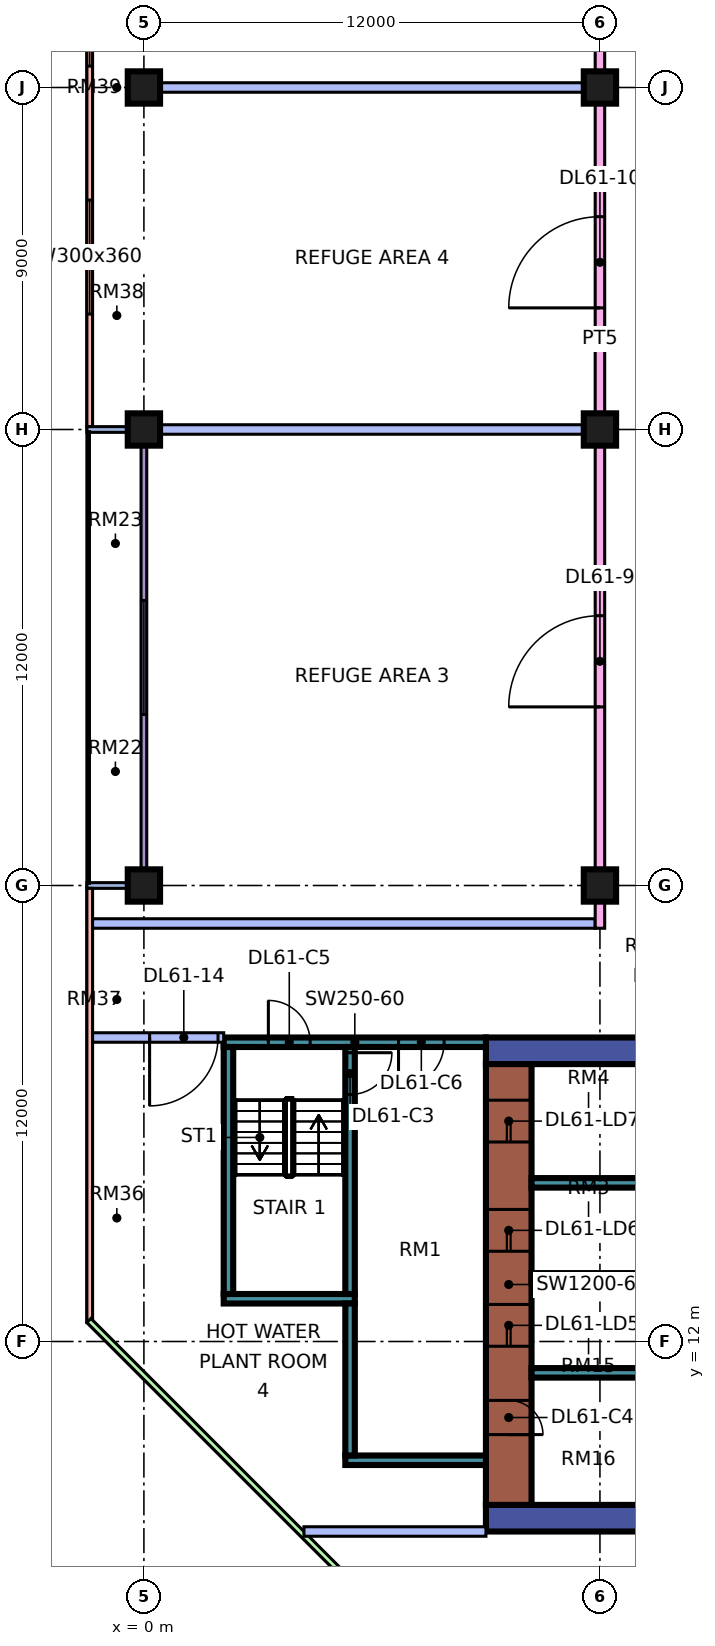
"""IFC4 building model, lengths in metres.
Left out: names, types, materials, properties, quantities, classifications, styles, units other than length and angle.
Written with IfcOpenShell. Run it as: python <this file> out.ifc"""

import sys

from ifc_helpers import new_model, si_unit, direction, frame, frame_2d, origin, origin_2d, place, context, subcontext, project, spatial, rectangle, extrude, element, fill, save


model = new_model("IFC4")
c1 = context("Model", 3, precision=1e-05, world=origin(), true_north=direction((0.0, 1.0)))
c2 = subcontext(c1, "Body", "Model", "MODEL_VIEW")
j1 = project(units=[si_unit("LENGTHUNIT", "METRE"), si_unit("PLANEANGLEUNIT", "RADIAN")], contexts=[c1])
p1 = place(None, origin())
s1 = spatial("IfcSite", under=j1, at=p1, CompositionType="ELEMENT")
p2 = place(p1, origin())
s2 = spatial("IfcBuilding", under=s1, at=p2, CompositionType="ELEMENT")
p3 = place(p2, frame((0.0, 0.0, 256.65)))
s3 = spatial("IfcBuildingStorey", under=s2, at=p3, CompositionType="ELEMENT", Elevation=256.65)
p4 = place(p3, frame((0.0, 24.0, 0.0), z_axis=(0.0, 0.0, 1.0), x_axis=(1.0, 0.0, 0.0)))
e1 = element("IfcColumn", 1, at=p4, inside=s3, PredefinedType="COLUMN", context=c2, shape_type="SweptSolid", body=[
    extrude(rectangle(XDim=0.85, YDim=0.85, at=origin_2d()), origin(), (0.0, 0.0, 1.0), 5.5),
])
p5 = place(p3, frame((0.0, 36.0, 0.0), z_axis=(0.0, 0.0, 1.0), x_axis=(1.0, 0.0, 0.0)))
e2 = element("IfcColumn", 2, at=p5, inside=s3, PredefinedType="COLUMN", context=c2, shape_type="SweptSolid", body=[
    extrude(rectangle(XDim=0.85, YDim=0.85, at=origin_2d()), origin(), (0.0, 0.0, 1.0), 5.5),
])
p6 = place(p3, frame((0.0, 45.0, 0.0), z_axis=(0.0, 0.0, 1.0), x_axis=(1.0, 0.0, 0.0)))
e3 = element("IfcColumn", 3, at=p6, inside=s3, PredefinedType="COLUMN", context=c2, shape_type="SweptSolid", body=[
    extrude(rectangle(XDim=0.85, YDim=0.85, at=origin_2d()), origin(), (0.0, 0.0, 1.0), 5.5),
])
for number, where, z_axis, x_axis in (
    (4, (12.0, 24.0, 0.0), (0.0, 0.0, 1.0), (1.0, 0.0, 0.0)),
    (5, (12.0, 36.0, 0.0), (0.0, 0.0, 1.0), (1.0, 0.0, 0.0)),
    (6, (12.0, 45.0, 0.0), (0.0, 0.0, 1.0), (1.0, 0.0, 0.0)),
):
    element("IfcColumn", number, at=place(p3, frame(where, z_axis=z_axis, x_axis=x_axis)), inside=s3, PredefinedType="COLUMN", context=c2, shape_type="SweptSolid", body=[
        extrude(rectangle(XDim=0.85, YDim=0.85, at=origin_2d()), origin(), (0.0, 0.0, 1.0), 5.5),
    ])
p7 = place(p3, frame((9.0, 7.35, 0.0), z_axis=(0.0, 0.0, 1.0), x_axis=(1.0, 0.0, 0.0)))
e7 = element("IfcWall", 7, at=p7, inside=s3, PredefinedType="SHEAR", context=c2, shape_type="SweptSolid", body=[
    extrude(rectangle(XDim=25.0, YDim=0.7, at=frame_2d((12.5, 0.0))), origin(), (0.0, 0.0, 1.0), 5.5),
])
p8 = place(p3, frame((9.0, 19.65, 0.0), z_axis=(0.0, 0.0, 1.0), x_axis=(1.0, 0.0, 0.0)))
e8 = element("IfcWall", 8, at=p8, inside=s3, PredefinedType="SHEAR", context=c2, shape_type="SweptSolid", body=[
    extrude(rectangle(XDim=25.0, YDim=0.7, at=frame_2d((12.5, 0.0))), origin(), (0.0, 0.0, 1.0), 5.5),
])
p9 = place(p8, frame((19.1, 0.0, 0.0)))
e9 = element("IfcOpeningElement", 9, at=p9, cuts=e8, PredefinedType="OPENING", context=c2, shape_type="SweptSolid", body=[
    extrude(rectangle(XDim=1.8, YDim=2.4, at=frame_2d((0.9, 1.2))), frame((0.0, 0.36, 0.0), z_axis=(0.0, -1.0, 0.0), x_axis=(1.0, 0.0, 0.0)), (0.0, 0.0, 1.0), 0.72),
])
p10 = place(p3, frame((9.6, 7.7, 0.0), z_axis=(0.0, 0.0, 1.0), x_axis=(0.0, 1.0, 0.0)))
e10 = element("IfcWall", 10, at=p10, inside=s3, PredefinedType="SHEAR", context=c2, shape_type="SweptSolid", body=[
    extrude(rectangle(XDim=11.6, YDim=1.2, at=frame_2d((5.8, 0.0))), origin(), (0.0, 0.0, 1.0), 5.5),
])
p11 = place(p10, frame((4.175, 0.0, 0.0)))
e11 = element("IfcOpeningElement", 11, at=p11, cuts=e10, PredefinedType="OPENING", context=c2, shape_type="SweptSolid", body=[
    extrude(rectangle(XDim=1.1, YDim=2.2, at=frame_2d((0.55, 1.1))), frame((0.0, 0.61, 0.0), z_axis=(0.0, -1.0, 0.0), x_axis=(1.0, 0.0, 0.0)), (0.0, 0.0, 1.0), 1.22),
])
p12 = place(p10, frame((6.675, 0.0, 0.0)))
e12 = element("IfcOpeningElement", 12, at=p12, cuts=e10, PredefinedType="OPENING", context=c2, shape_type="SweptSolid", body=[
    extrude(rectangle(XDim=1.1, YDim=2.2, at=frame_2d((0.55, 1.1))), frame((0.0, 0.61, 0.0), z_axis=(0.0, -1.0, 0.0), x_axis=(1.0, 0.0, 0.0)), (0.0, 0.0, 1.0), 1.22),
])
p13 = place(p10, frame((9.55, 0.0, 0.0)))
e13 = element("IfcOpeningElement", 13, at=p13, cuts=e10, PredefinedType="OPENING", context=c2, shape_type="SweptSolid", body=[
    extrude(rectangle(XDim=1.1, YDim=2.2, at=frame_2d((0.55, 1.1))), frame((0.0, 0.61, 0.0), z_axis=(0.0, -1.0, 0.0), x_axis=(1.0, 0.0, 0.0)), (0.0, 0.0, 1.0), 1.22),
])
p14 = place(p10, frame((1.85, 0.0, 0.0)))
e14 = element("IfcOpeningElement", 14, at=p14, cuts=e10, PredefinedType="OPENING", context=c2, shape_type="SweptSolid", body=[
    extrude(rectangle(XDim=0.9, YDim=2.1, at=frame_2d((0.45, 1.05))), frame((0.0, 0.61, 0.0), z_axis=(0.0, -1.0, 0.0), x_axis=(1.0, 0.0, 0.0)), (0.0, 0.0, 1.0), 1.22),
])
for number, where, z_axis, x_axis in (
    (15, (10.2, 11.175, 0.0), (0.0, 0.0, 1.0), (1.0, 0.0, 0.0)),
    (16, (10.2, 13.675, 0.0), (0.0, 0.0, 1.0), (1.0, 0.0, 0.0)),
    (17, (10.2, 16.175, 0.0), (0.0, 0.0, 1.0), (1.0, 0.0, 0.0)),
):
    element("IfcWall", number, at=place(p3, frame(where, z_axis=z_axis, x_axis=x_axis)), inside=s3, PredefinedType="SHEAR", context=c2, shape_type="SweptSolid", body=[
        extrude(rectangle(XDim=3.0, YDim=0.25, at=frame_2d((1.5, 0.0))), origin(), (0.0, 0.0, 1.0), 5.5),
    ])
p15 = place(p3, frame((2.1, 19.875, 0.0), z_axis=(0.0, 0.0, 1.0), x_axis=(1.0, 0.0, 0.0)))
e18 = element("IfcWall", 18, at=p15, inside=s3, PredefinedType="SHEAR", context=c2, shape_type="SweptSolid", body=[
    extrude(rectangle(XDim=6.9, YDim=0.25, at=frame_2d((3.45, 0.0))), origin(), (0.0, 0.0, 1.0), 5.5),
])
p16 = place(p15, frame((1.175, 0.0, 0.0)))
e19 = element("IfcOpeningElement", 19, at=p16, cuts=e18, PredefinedType="OPENING", context=c2, shape_type="SweptSolid", body=[
    extrude(rectangle(XDim=1.1, YDim=2.2, at=frame_2d((0.55, 1.1))), frame((0.0, 0.135, 0.0), z_axis=(0.0, -1.0, 0.0), x_axis=(1.0, 0.0, 0.0)), (0.0, 0.0, 1.0), 0.27),
])
p17 = place(p15, frame((4.6, 0.0, 0.0)))
e20 = element("IfcOpeningElement", 20, at=p17, cuts=e18, PredefinedType="OPENING", context=c2, shape_type="SweptSolid", body=[
    extrude(rectangle(XDim=1.2, YDim=2.2, at=frame_2d((0.6, 1.1))), frame((0.0, 0.135, 0.0), z_axis=(0.0, -1.0, 0.0), x_axis=(1.0, 0.0, 0.0)), (0.0, 0.0, 1.0), 0.27),
])
p18 = place(p3, frame((2.1, 13.125, 0.0), z_axis=(0.0, 0.0, 1.0), x_axis=(1.0, 0.0, 0.0)))
e21 = element("IfcWall", 21, at=p18, inside=s3, PredefinedType="SHEAR", context=c2, shape_type="SweptSolid", body=[
    extrude(rectangle(XDim=3.45, YDim=0.25, at=frame_2d((1.725, 0.0))), origin(), (0.0, 0.0, 1.0), 5.5),
])
p19 = place(p3, frame((2.225, 13.25, 0.0), z_axis=(0.0, 0.0, 1.0), x_axis=(0.0, 1.0, 0.0)))
e22 = element("IfcWall", 22, at=p19, inside=s3, PredefinedType="SHEAR", context=c2, shape_type="SweptSolid", body=[
    extrude(rectangle(XDim=6.5, YDim=0.25, at=frame_2d((3.25, 0.0))), origin(), (0.0, 0.0, 1.0), 5.5),
])
p20 = place(p3, frame((5.425, 13.25, 0.0), z_axis=(0.0, 0.0, 1.0), x_axis=(0.0, 1.0, 0.0)))
e23 = element("IfcWall", 23, at=p20, inside=s3, PredefinedType="SHEAR", context=c2, shape_type="SweptSolid", body=[
    extrude(rectangle(XDim=6.5, YDim=0.25, at=frame_2d((3.25, 0.0))), origin(), (0.0, 0.0, 1.0), 5.5),
])
p21 = place(p20, frame((5.25, 0.0, 0.0)))
e24 = element("IfcOpeningElement", 24, at=p21, cuts=e23, PredefinedType="OPENING", context=c2, shape_type="SweptSolid", body=[
    extrude(rectangle(XDim=1.1, YDim=2.2, at=frame_2d((0.55, 1.1))), frame((0.0, 0.135, 0.0), z_axis=(0.0, -1.0, 0.0), x_axis=(1.0, 0.0, 0.0)), (0.0, 0.0, 1.0), 0.27),
])
p22 = place(p3, frame((5.3, 8.875, 0.0), z_axis=(0.0, 0.0, 1.0), x_axis=(1.0, 0.0, 0.0)))
e25 = element("IfcWall", 25, at=p22, inside=s3, PredefinedType="SHEAR", context=c2, shape_type="SweptSolid", body=[
    extrude(rectangle(XDim=3.7, YDim=0.25, at=frame_2d((1.85, 0.0))), origin(), (0.0, 0.0, 1.0), 5.5),
])
p23 = place(p3, frame((5.425, 9.0, 0.0), z_axis=(0.0, 0.0, 1.0), x_axis=(0.0, 1.0, 0.0)))
e26 = element("IfcWall", 26, at=p23, inside=s3, PredefinedType="SHEAR", context=c2, shape_type="SweptSolid", body=[
    extrude(rectangle(XDim=4.0, YDim=0.25, at=frame_2d((2.0, 0.0))), origin(), (0.0, 0.0, 1.0), 5.5),
])
p24 = place(p3, frame((-1.425, 47.925, 0.0), z_axis=(0.0, 0.0, 1.0), x_axis=(0.0, -1.0, 0.0)))
e27 = element("IfcWall", 27, at=p24, inside=s3, PredefinedType="SOLIDWALL", context=c2, shape_type="SweptSolid", body=[
    extrude(rectangle(XDim=11.85, YDim=0.15, at=frame_2d((5.925, 0.0))), origin(), (0.0, 0.0, 1.0), 5.05),
])
p25 = place(p24, frame((0.562, 0.0, 0.45)))
e28 = element("IfcOpeningElement", 28, at=p25, cuts=e27, PredefinedType="OPENING", context=c2, shape_type="SweptSolid", body=[
    extrude(rectangle(XDim=1.8, YDim=3.6, at=frame_2d((0.9, 1.8))), frame((0.0, 0.085, 0.0), z_axis=(0.0, -1.0, 0.0), x_axis=(1.0, 0.0, 0.0)), (0.0, 0.0, 1.0), 0.17),
])
p26 = place(p24, frame((5.887, 0.0, 0.45)))
e29 = element("IfcOpeningElement", 29, at=p26, cuts=e27, PredefinedType="OPENING", context=c2, shape_type="SweptSolid", body=[
    extrude(rectangle(XDim=3.0, YDim=3.6, at=frame_2d((1.5, 1.8))), frame((0.0, 0.085, 0.0), z_axis=(0.0, -1.0, 0.0), x_axis=(1.0, 0.0, 0.0)), (0.0, 0.0, 1.0), 0.17),
])
p27 = place(p3, frame((0.0, 35.925, 0.0), z_axis=(0.0, 0.0, 1.0), x_axis=(0.0, -1.0, 0.0)))
e30 = element("IfcWall", 30, at=p27, inside=s3, PredefinedType="SOLIDWALL", context=c2, shape_type="SweptSolid", body=[
    extrude(rectangle(XDim=11.85, YDim=0.15, at=frame_2d((5.925, 0.0))), origin(), (0.0, 0.0, 1.0), 5.05),
])
p28 = place(p27, frame((4.425, 0.0, 0.45)))
e31 = element("IfcOpeningElement", 31, at=p28, cuts=e30, PredefinedType="OPENING", context=c2, shape_type="SweptSolid", body=[
    extrude(rectangle(XDim=3.0, YDim=3.6, at=frame_2d((1.5, 1.8))), frame((0.0, 0.085, 0.0), z_axis=(0.0, -1.0, 0.0), x_axis=(1.0, 0.0, 0.0)), (0.0, 0.0, 1.0), 0.17),
])
for number, where, z_axis, x_axis in (
    (32, (-1.5, 36.0, 0.0), (0.0, 0.0, 1.0), (1.0, 0.0, 0.0)),
    (33, (-1.5, 24.0, 0.0), (0.0, 0.0, 1.0), (1.0, 0.0, 0.0)),
):
    element("IfcWall", number, at=place(p3, frame(where, z_axis=z_axis, x_axis=x_axis)), inside=s3, PredefinedType="SOLIDWALL", context=c2, shape_type="SweptSolid", body=[
        extrude(rectangle(XDim=1.5, YDim=0.15, at=frame_2d((0.75, 0.0))), origin(), (0.0, 0.0, 1.0), 5.05),
    ])
p29 = place(p3, frame((-1.425, 23.925, 0.0), z_axis=(0.0, 0.0, 1.0), x_axis=(0.0, -1.0, 0.0)))
e34 = element("IfcWall", 34, at=p29, inside=s3, PredefinedType="SOLIDWALL", context=c2, shape_type="SweptSolid", body=[
    extrude(rectangle(XDim=11.425, YDim=0.15, at=frame_2d((5.712, 0.0))), origin(), (0.0, 0.0, 1.0), 5.05),
])
p30 = place(p3, frame((-1.447, 12.553, 0.0), z_axis=(0.0, 0.0, 1.0), x_axis=(0.707106781187, -0.707106781187, 0.0)))
e35 = element("IfcWall", 35, at=p30, inside=s3, PredefinedType="SOLIDWALL", context=c2, shape_type="SweptSolid", body=[
    extrude(rectangle(XDim=19.799, YDim=0.15, at=frame_2d((9.899, 0.0))), origin(), (0.0, 0.0, 1.0), 5.05),
])
p31 = place(p30, frame((11.453, 0.0, 0.45)))
e36 = element("IfcOpeningElement", 36, at=p31, cuts=e35, PredefinedType="OPENING", context=c2, shape_type="SweptSolid", body=[
    extrude(rectangle(XDim=3.0, YDim=3.6, at=frame_2d((1.5, 1.8))), frame((0.0, 0.085, 0.0), z_axis=(0.0, -1.0, 0.0), x_axis=(1.0, 0.0, 0.0)), (0.0, 0.0, 1.0), 0.17),
])
p32 = place(p3, frame((-1.35, 20.0, 0.0), z_axis=(0.0, 0.0, 1.0), x_axis=(1.0, 0.0, 0.0)))
e37 = element("IfcWall", 37, at=p32, inside=s3, PredefinedType="PARTITIONING", context=c2, shape_type="SweptSolid", body=[
    extrude(rectangle(XDim=3.45, YDim=0.25, at=frame_2d((1.725, 0.0))), origin(), (0.0, 0.0, 1.0), 5.05),
])
p33 = place(p32, frame((1.5, 0.0, 0.0)))
e38 = element("IfcOpeningElement", 38, at=p33, cuts=e37, PredefinedType="OPENING", context=c2, shape_type="SweptSolid", body=[
    extrude(rectangle(XDim=1.8, YDim=2.1, at=frame_2d((0.9, 1.05))), frame((0.0, 0.135, 0.0), z_axis=(0.0, -1.0, 0.0), x_axis=(1.0, 0.0, 0.0)), (0.0, 0.0, 1.0), 0.27),
])
p34 = place(p3, frame((-1.35, 23.0, 0.0), z_axis=(0.0, 0.0, 1.0), x_axis=(1.0, 0.0, 0.0)))
e39 = element("IfcWall", 39, at=p34, inside=s3, PredefinedType="PARTITIONING", context=c2, shape_type="SweptSolid", body=[
    extrude(rectangle(XDim=13.225, YDim=0.25, at=frame_2d((6.613, 0.0))), origin(), (0.0, 0.0, 1.0), 5.05),
])
e40 = element("IfcWall", 40, at=p5, inside=s3, PredefinedType="PARTITIONING", context=c2, shape_type="SweptSolid", body=[
    extrude(rectangle(XDim=11.875, YDim=0.25, at=frame_2d((5.938, 0.0))), origin(), (0.0, 0.0, 1.0), 5.05),
])
e41 = element("IfcWall", 41, at=p6, inside=s3, PredefinedType="PARTITIONING", context=c2, shape_type="SweptSolid", body=[
    extrude(rectangle(XDim=11.875, YDim=0.25, at=frame_2d((5.938, 0.0))), origin(), (0.0, 0.0, 1.0), 5.05),
])
p35 = place(p3, frame((4.211, 7.0, 0.0), z_axis=(0.0, 0.0, 1.0), x_axis=(1.0, 0.0, 0.0)))
e42 = element("IfcWall", 42, at=p35, inside=s3, PredefinedType="PARTITIONING", context=c2, shape_type="SweptSolid", body=[
    extrude(rectangle(XDim=4.789, YDim=0.25, at=frame_2d((2.395, 0.0))), origin(), (0.0, 0.0, 1.0), 5.05),
])
p36 = place(p3, frame((12.0, 22.875, 0.0), z_axis=(0.0, 0.0, 1.0), x_axis=(0.0, 1.0, 0.0)))
e43 = element("IfcWall", 43, at=p36, inside=s3, PredefinedType="PARTITIONING", context=c2, shape_type="SweptSolid", body=[
    extrude(rectangle(XDim=31.0, YDim=0.25, at=frame_2d((15.5, 0.0))), origin(), (0.0, 0.0, 1.0), 2.45),
])
p37 = place(p36, frame((5.825, 0.0, 0.0)))
e44 = element("IfcOpeningElement", 44, at=p37, cuts=e43, PredefinedType="OPENING", context=c2, shape_type="SweptSolid", body=[
    extrude(rectangle(XDim=2.4, YDim=2.1, at=frame_2d((1.2, 1.05))), frame((0.0, 0.135, 0.0), z_axis=(0.0, -1.0, 0.0), x_axis=(1.0, 0.0, 0.0)), (0.0, 0.0, 1.0), 0.27),
])
p38 = place(p36, frame((16.325, 0.0, 0.0)))
e45 = element("IfcOpeningElement", 45, at=p38, cuts=e43, PredefinedType="OPENING", context=c2, shape_type="SweptSolid", body=[
    extrude(rectangle(XDim=2.4, YDim=2.1, at=frame_2d((1.2, 1.05))), frame((0.0, 0.135, 0.0), z_axis=(0.0, -1.0, 0.0), x_axis=(1.0, 0.0, 0.0)), (0.0, 0.0, 1.0), 0.27),
])
p39 = place(p36, frame((25.325, 0.0, 0.0)))
e46 = element("IfcOpeningElement", 46, at=p39, cuts=e43, PredefinedType="OPENING", context=c2, shape_type="SweptSolid", body=[
    extrude(rectangle(XDim=2.4, YDim=2.1, at=frame_2d((1.2, 1.05))), frame((0.0, 0.135, 0.0), z_axis=(0.0, -1.0, 0.0), x_axis=(1.0, 0.0, 0.0)), (0.0, 0.0, 1.0), 0.27),
])
p40 = place(p25, origin())
e47 = element("IfcWindow", 47, at=p40, inside=s3, PartitioningType="SINGLE_PANEL", PredefinedType="WINDOW", context=c2, shape_type="SweptSolid", body=[
    extrude(rectangle(XDim=1.8, YDim=3.6, at=frame_2d((0.9, 1.8))), frame((0.0, 0.03, 0.0), z_axis=(0.0, -1.0, 0.0), x_axis=(1.0, 0.0, 0.0)), (0.0, 0.0, 1.0), 0.06),
])
fill(e28, e47)
p41 = place(p26, origin())
e48 = element("IfcWindow", 48, at=p41, inside=s3, PartitioningType="SINGLE_PANEL", PredefinedType="WINDOW", context=c2, shape_type="SweptSolid", body=[
    extrude(rectangle(XDim=3.0, YDim=3.6, at=frame_2d((1.5, 1.8))), frame((0.0, 0.03, 0.0), z_axis=(0.0, -1.0, 0.0), x_axis=(1.0, 0.0, 0.0)), (0.0, 0.0, 1.0), 0.06),
])
fill(e29, e48)
p42 = place(p28, origin())
e49 = element("IfcWindow", 49, at=p42, inside=s3, PartitioningType="SINGLE_PANEL", PredefinedType="WINDOW", context=c2, shape_type="SweptSolid", body=[
    extrude(rectangle(XDim=3.0, YDim=3.6, at=frame_2d((1.5, 1.8))), frame((0.0, 0.03, 0.0), z_axis=(0.0, -1.0, 0.0), x_axis=(1.0, 0.0, 0.0)), (0.0, 0.0, 1.0), 0.06),
])
fill(e31, e49)
p43 = place(p11, origin())
e50 = element("IfcDoor", 50, at=p43, inside=s3, OperationType="DOUBLE_DOOR_SLIDING", PredefinedType="DOOR", context=c2, shape_type="SweptSolid", body=[
    extrude(rectangle(XDim=1.1, YDim=2.2, at=frame_2d((0.55, 1.1))), frame((0.0, 0.025, 0.0), z_axis=(0.0, -1.0, 0.0), x_axis=(1.0, 0.0, 0.0)), (0.0, 0.0, 1.0), 0.05),
])
fill(e11, e50)
p44 = place(p12, origin())
e51 = element("IfcDoor", 51, at=p44, inside=s3, OperationType="DOUBLE_DOOR_SLIDING", PredefinedType="DOOR", context=c2, shape_type="SweptSolid", body=[
    extrude(rectangle(XDim=1.1, YDim=2.2, at=frame_2d((0.55, 1.1))), frame((0.0, 0.025, 0.0), z_axis=(0.0, -1.0, 0.0), x_axis=(1.0, 0.0, 0.0)), (0.0, 0.0, 1.0), 0.05),
])
fill(e12, e51)
p45 = place(p13, origin())
e52 = element("IfcDoor", 52, at=p45, inside=s3, OperationType="DOUBLE_DOOR_SLIDING", PredefinedType="DOOR", context=c2, shape_type="SweptSolid", body=[
    extrude(rectangle(XDim=1.1, YDim=2.2, at=frame_2d((0.55, 1.1))), frame((0.0, 0.025, 0.0), z_axis=(0.0, -1.0, 0.0), x_axis=(1.0, 0.0, 0.0)), (0.0, 0.0, 1.0), 0.05),
])
fill(e13, e52)
p46 = place(p21, origin())
e53 = element("IfcDoor", 53, at=p46, inside=s3, OperationType="SINGLE_SWING_RIGHT", PredefinedType="DOOR", context=c2, shape_type="SweptSolid", body=[
    extrude(rectangle(XDim=1.1, YDim=2.2, at=frame_2d((0.55, 1.1))), frame((0.0, 0.025, 0.0), z_axis=(0.0, -1.0, 0.0), x_axis=(1.0, 0.0, 0.0)), (0.0, 0.0, 1.0), 0.05),
])
fill(e24, e53)
p47 = place(p14, frame((0.9, 0.0, 0.0), z_axis=(0.0, 0.0, 1.0), x_axis=(-1.0, 0.0, 0.0)))
e54 = element("IfcDoor", 54, at=p47, inside=s3, OperationType="SINGLE_SWING_LEFT", PredefinedType="DOOR", context=c2, shape_type="SweptSolid", body=[
    extrude(rectangle(XDim=0.9, YDim=2.1, at=frame_2d((0.45, 1.05))), frame((0.0, 0.025, 0.0), z_axis=(0.0, -1.0, 0.0), x_axis=(1.0, 0.0, 0.0)), (0.0, 0.0, 1.0), 0.05),
])
fill(e14, e54)
p48 = place(p16, origin())
e55 = element("IfcDoor", 55, at=p48, inside=s3, OperationType="SINGLE_SWING_LEFT", PredefinedType="DOOR", context=c2, shape_type="SweptSolid", body=[
    extrude(rectangle(XDim=1.1, YDim=2.2, at=frame_2d((0.55, 1.1))), frame((0.0, 0.025, 0.0), z_axis=(0.0, -1.0, 0.0), x_axis=(1.0, 0.0, 0.0)), (0.0, 0.0, 1.0), 0.05),
])
fill(e19, e55)
p49 = place(p17, frame((1.2, 0.0, 0.0), z_axis=(0.0, 0.0, 1.0), x_axis=(-1.0, 0.0, 0.0)))
e56 = element("IfcDoor", 56, at=p49, inside=s3, OperationType="SINGLE_SWING_LEFT", PredefinedType="DOOR", context=c2, shape_type="SweptSolid", body=[
    extrude(rectangle(XDim=1.2, YDim=2.2, at=frame_2d((0.6, 1.1))), frame((0.0, 0.025, 0.0), z_axis=(0.0, -1.0, 0.0), x_axis=(1.0, 0.0, 0.0)), (0.0, 0.0, 1.0), 0.05),
])
fill(e20, e56)
p50 = place(p37, origin())
e57 = element("IfcDoor", 57, at=p50, inside=s3, OperationType="DOUBLE_DOOR_SINGLE_SWING", PredefinedType="DOOR", context=c2, shape_type="SweptSolid", body=[
    extrude(rectangle(XDim=2.4, YDim=2.1, at=frame_2d((1.2, 1.05))), frame((0.0, 0.025, 0.0), z_axis=(0.0, -1.0, 0.0), x_axis=(1.0, 0.0, 0.0)), (0.0, 0.0, 1.0), 0.05),
])
fill(e44, e57)
p51 = place(p38, origin())
e58 = element("IfcDoor", 58, at=p51, inside=s3, OperationType="DOUBLE_DOOR_SINGLE_SWING", PredefinedType="DOOR", context=c2, shape_type="SweptSolid", body=[
    extrude(rectangle(XDim=2.4, YDim=2.1, at=frame_2d((1.2, 1.05))), frame((0.0, 0.025, 0.0), z_axis=(0.0, -1.0, 0.0), x_axis=(1.0, 0.0, 0.0)), (0.0, 0.0, 1.0), 0.05),
])
fill(e45, e58)
p52 = place(p33, frame((1.8, 0.0, 0.0), z_axis=(0.0, 0.0, 1.0), x_axis=(-1.0, 0.0, 0.0)))
e59 = element("IfcDoor", 59, at=p52, inside=s3, OperationType="DOUBLE_DOOR_SINGLE_SWING", PredefinedType="DOOR", context=c2, shape_type="SweptSolid", body=[
    extrude(rectangle(XDim=1.8, YDim=2.1, at=frame_2d((0.9, 1.05))), frame((0.0, 0.025, 0.0), z_axis=(0.0, -1.0, 0.0), x_axis=(1.0, 0.0, 0.0)), (0.0, 0.0, 1.0), 0.05),
])
fill(e38, e59)
save(model, sys.argv[1])
